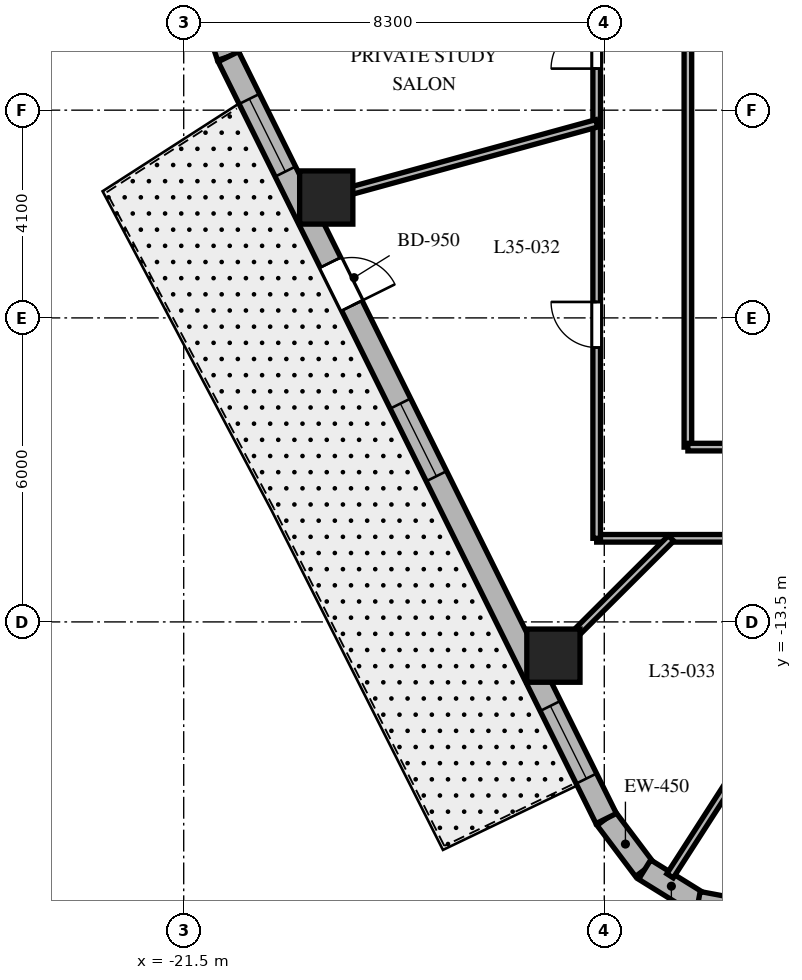
"""IFC4 building model, lengths in metres.
Left out: names, types, materials, properties, quantities, classifications, styles, units other than length and angle.
Written with IfcOpenShell. Run it as: python <this file> out.ifc"""

import sys

from ifc_helpers import new_model, si_unit, direction, frame, frame_2d, origin, origin_2d, place, context, subcontext, project, spatial, rectangle, extrude, element, fill, save


model = new_model("IFC4")
c1 = context("Model", 3, precision=1e-05, world=origin(), true_north=direction((0.0, 1.0)))
c2 = subcontext(c1, "Body", "Model", "MODEL_VIEW")
j1 = project(units=[si_unit("LENGTHUNIT", "METRE"), si_unit("PLANEANGLEUNIT", "RADIAN")], contexts=[c1])
p1 = place(None, origin())
s1 = spatial("IfcSite", under=j1, at=p1, CompositionType="ELEMENT")
p2 = place(p1, origin())
s2 = spatial("IfcBuilding", under=s1, at=p2, CompositionType="ELEMENT")
p3 = place(p2, frame((0.0, 0.0, 144.3)))
s3 = spatial("IfcBuildingStorey", under=s2, at=p3, CompositionType="ELEMENT", Elevation=144.3)
for number, where, z_axis, x_axis in (
    (1, (-18.687, -5.124, 0.0), (0.0, 0.0, 1.0), (1.0, 0.0, 0.0)),
    (2, (-14.204, -14.166, 0.0), (0.0, 0.0, 1.0), (1.0, 0.0, 0.0)),
):
    element("IfcColumn", number, at=place(p3, frame(where, z_axis=z_axis, x_axis=x_axis)), inside=s3, PredefinedType="COLUMN", context=c2, shape_type="SweptSolid", body=[
        extrude(rectangle(XDim=1.05, YDim=1.05, at=origin_2d()), origin(), (0.0, 0.0, 1.0), 3.7),
    ])
p4 = place(p3, frame((-13.162, -17.381, 0.0), z_axis=(0.0, 0.0, 1.0), x_axis=(0.601515770517, -0.798860925205, 0.0)))
e3 = element("IfcWall", 3, at=p4, inside=s3, PredefinedType="SOLIDWALL", context=c2, shape_type="SweptSolid", body=[
    extrude(rectangle(XDim=1.262, YDim=0.45, at=frame_2d((0.631, 0.0))), origin(), (0.0, 0.0, 1.0), 3.4),
])
p5 = place(p3, frame((-12.403, -18.389, 0.0), z_axis=(0.0, 0.0, 1.0), x_axis=(0.849795170926, -0.527113049991, 0.0)))
e4 = element("IfcWall", 4, at=p5, inside=s3, PredefinedType="SOLIDWALL", context=c2, shape_type="SweptSolid", body=[
    extrude(rectangle(XDim=1.241, YDim=0.45, at=frame_2d((0.62, 0.0))), origin(), (0.0, 0.0, 1.0), 3.4),
])
p6 = place(p3, frame((-11.349, -19.043, 0.0), z_axis=(0.0, 0.0, 1.0), x_axis=(0.982931267051, -0.183973161772, 0.0)))
e5 = element("IfcWall", 5, at=p6, inside=s3, PredefinedType="SOLIDWALL", context=c2, shape_type="SweptSolid", body=[
    extrude(rectangle(XDim=1.262, YDim=0.45, at=frame_2d((0.631, 0.0))), origin(), (0.0, 0.0, 1.0), 3.4),
])
p7 = place(p3, frame((-20.911, -1.484, 0.0), z_axis=(0.0, 0.0, 1.0), x_axis=(0.321623334353, -0.946867694453, 0.0)))
e6 = element("IfcWall", 6, at=p7, inside=s3, PredefinedType="SOLIDWALL", context=c2, shape_type="SweptSolid", body=[
    extrude(rectangle(XDim=0.909, YDim=0.45, at=frame_2d((0.454, 0.0))), origin(), (0.0, 0.0, 1.0), 3.4),
])
p8 = place(p3, frame((-20.618, -2.344, 0.0), z_axis=(0.0, 0.0, 1.0), x_axis=(0.444243691097, -0.895905990002, 0.0)))
e7 = element("IfcWall", 7, at=p8, inside=s3, PredefinedType="SOLIDWALL", context=c2, shape_type="SweptSolid", body=[
    extrude(rectangle(XDim=16.784, YDim=0.45, at=frame_2d((8.392, 0.0))), origin(), (0.0, 0.0, 1.0), 3.4),
])
p9 = place(p8, frame((4.535, 0.0, 0.0)))
e8 = element("IfcOpeningElement", 8, at=p9, cuts=e7, PredefinedType="OPENING", context=c2, shape_type="SweptSolid", body=[
    extrude(rectangle(XDim=0.95, YDim=2.15, at=frame_2d((0.475, 1.075))), frame((0.0, 0.235, 0.0), z_axis=(0.0, -1.0, 0.0), x_axis=(1.0, 0.0, 0.0)), (0.0, 0.0, 1.0), 0.47),
])
p10 = place(p8, frame((0.931, 0.0, 0.8)))
e9 = element("IfcOpeningElement", 9, at=p10, cuts=e7, PredefinedType="OPENING", context=c2, shape_type="SweptSolid", body=[
    extrude(rectangle(XDim=1.6, YDim=1.75, at=frame_2d((0.8, 0.875))), frame((0.0, 0.235, 0.0), z_axis=(0.0, -1.0, 0.0), x_axis=(1.0, 0.0, 0.0)), (0.0, 0.0, 1.0), 0.47),
])
p11 = place(p8, frame((7.642, 0.0, 0.8)))
e10 = element("IfcOpeningElement", 10, at=p11, cuts=e7, PredefinedType="OPENING", context=c2, shape_type="SweptSolid", body=[
    extrude(rectangle(XDim=1.6, YDim=1.75, at=frame_2d((0.8, 0.875))), frame((0.0, 0.235, 0.0), z_axis=(0.0, -1.0, 0.0), x_axis=(1.0, 0.0, 0.0)), (0.0, 0.0, 1.0), 0.47),
])
p12 = place(p8, frame((14.303, 0.0, 0.8)))
e11 = element("IfcOpeningElement", 11, at=p12, cuts=e7, PredefinedType="OPENING", context=c2, shape_type="SweptSolid", body=[
    extrude(rectangle(XDim=1.6, YDim=1.75, at=frame_2d((0.8, 0.875))), frame((0.0, 0.235, 0.0), z_axis=(0.0, -1.0, 0.0), x_axis=(1.0, 0.0, 0.0)), (0.0, 0.0, 1.0), 0.47),
])
p13 = place(p3, frame((13.35, -11.85, 0.0), z_axis=(0.0, 0.0, 1.0), x_axis=(-1.0, 0.0, 0.0)))
e12 = element("IfcWall", 12, at=p13, inside=s3, PredefinedType="PARTITIONING", context=c2, shape_type="SweptSolid", body=[
    extrude(rectangle(XDim=26.7, YDim=0.15, at=frame_2d((13.35, 0.0))), origin(), (0.0, 0.0, 1.0), 2.84),
])
p14 = place(p13, frame((22.7, 0.0, 0.0)))
e13 = element("IfcOpeningElement", 13, at=p14, cuts=e12, PredefinedType="OPENING", context=c2, shape_type="SweptSolid", body=[
    extrude(rectangle(XDim=0.9, YDim=2.03, at=frame_2d((0.45, 1.015))), frame((0.0, 0.085, 0.0), z_axis=(0.0, -1.0, 0.0), x_axis=(1.0, 0.0, 0.0)), (0.0, 0.0, 1.0), 0.17),
])
p15 = place(p13, frame((18.523, 0.0, 0.0)))
e14 = element("IfcOpeningElement", 14, at=p15, cuts=e12, PredefinedType="OPENING", context=c2, shape_type="SweptSolid", body=[
    extrude(rectangle(XDim=0.95, YDim=2.03, at=frame_2d((0.475, 1.015))), frame((0.0, 0.085, 0.0), z_axis=(0.0, -1.0, 0.0), x_axis=(1.0, 0.0, 0.0)), (0.0, 0.0, 1.0), 0.17),
])
p16 = place(p13, frame((12.362, 0.0, 0.0)))
e15 = element("IfcOpeningElement", 15, at=p16, cuts=e12, PredefinedType="OPENING", context=c2, shape_type="SweptSolid", body=[
    extrude(rectangle(XDim=0.95, YDim=2.03, at=frame_2d((0.475, 1.015))), frame((0.0, 0.085, 0.0), z_axis=(0.0, -1.0, 0.0), x_axis=(1.0, 0.0, 0.0)), (0.0, 0.0, 1.0), 0.17),
])
p17 = place(p13, frame((6.061, 0.0, 0.0)))
e16 = element("IfcOpeningElement", 16, at=p17, cuts=e12, PredefinedType="OPENING", context=c2, shape_type="SweptSolid", body=[
    extrude(rectangle(XDim=0.95, YDim=2.03, at=frame_2d((0.475, 1.015))), frame((0.0, 0.085, 0.0), z_axis=(0.0, -1.0, 0.0), x_axis=(1.0, 0.0, 0.0)), (0.0, 0.0, 1.0), 0.17),
])
p18 = place(p13, frame((1.886, 0.0, 0.0)))
e17 = element("IfcOpeningElement", 17, at=p18, cuts=e12, PredefinedType="OPENING", context=c2, shape_type="SweptSolid", body=[
    extrude(rectangle(XDim=0.9, YDim=2.03, at=frame_2d((0.45, 1.015))), frame((0.0, 0.085, 0.0), z_axis=(0.0, -1.0, 0.0), x_axis=(1.0, 0.0, 0.0)), (0.0, 0.0, 1.0), 0.17),
])
p19 = place(p3, frame((-13.35, -11.85, 0.0), z_axis=(0.0, 0.0, 1.0), x_axis=(0.0, 1.0, 0.0)))
e18 = element("IfcWall", 18, at=p19, inside=s3, PredefinedType="PARTITIONING", context=c2, shape_type="SweptSolid", body=[
    extrude(rectangle(XDim=23.7, YDim=0.15, at=frame_2d((11.85, 0.0))), origin(), (0.0, 0.0, 1.0), 2.84),
])
p20 = place(p19, frame((18.389, 0.0, 0.0)))
e19 = element("IfcOpeningElement", 19, at=p20, cuts=e18, PredefinedType="OPENING", context=c2, shape_type="SweptSolid", body=[
    extrude(rectangle(XDim=0.95, YDim=2.03, at=frame_2d((0.475, 1.015))), frame((0.0, 0.085, 0.0), z_axis=(0.0, -1.0, 0.0), x_axis=(1.0, 0.0, 0.0)), (0.0, 0.0, 1.0), 0.17),
])
p21 = place(p19, frame((12.315, 0.0, 0.0)))
e20 = element("IfcOpeningElement", 20, at=p21, cuts=e18, PredefinedType="OPENING", context=c2, shape_type="SweptSolid", body=[
    extrude(rectangle(XDim=0.9, YDim=2.03, at=frame_2d((0.45, 1.015))), frame((0.0, 0.085, 0.0), z_axis=(0.0, -1.0, 0.0), x_axis=(1.0, 0.0, 0.0)), (0.0, 0.0, 1.0), 0.17),
])
p22 = place(p19, frame((9.27, 0.0, 0.0)))
e21 = element("IfcOpeningElement", 21, at=p22, cuts=e18, PredefinedType="OPENING", context=c2, shape_type="SweptSolid", body=[
    extrude(rectangle(XDim=0.9, YDim=2.03, at=frame_2d((0.45, 1.015))), frame((0.0, 0.085, 0.0), z_axis=(0.0, -1.0, 0.0), x_axis=(1.0, 0.0, 0.0)), (0.0, 0.0, 1.0), 0.17),
])
p23 = place(p19, frame((3.765, 0.0, 0.0)))
e22 = element("IfcOpeningElement", 22, at=p23, cuts=e18, PredefinedType="OPENING", context=c2, shape_type="SweptSolid", body=[
    extrude(rectangle(XDim=0.9, YDim=2.03, at=frame_2d((0.45, 1.015))), frame((0.0, 0.085, 0.0), z_axis=(0.0, -1.0, 0.0), x_axis=(1.0, 0.0, 0.0)), (0.0, 0.0, 1.0), 0.17),
])
p24 = place(p3, frame((-11.55, 2.7, 0.0), z_axis=(0.0, 0.0, 1.0), x_axis=(0.0, -1.0, 0.0)))
e23 = element("IfcWall", 23, at=p24, inside=s3, PredefinedType="PARTITIONING", context=c2, shape_type="SweptSolid", body=[
    extrude(rectangle(XDim=12.75, YDim=0.15, at=frame_2d((6.375, 0.0))), origin(), (0.0, 0.0, 1.0), 2.84),
])
p25 = place(p3, frame((-11.55, -10.05, 0.0), z_axis=(0.0, 0.0, 1.0), x_axis=(1.0, 0.0, 0.0)))
e24 = element("IfcWall", 24, at=p25, inside=s3, PredefinedType="PARTITIONING", context=c2, shape_type="SweptSolid", body=[
    extrude(rectangle(XDim=11.55, YDim=0.15, at=frame_2d((5.775, 0.0))), origin(), (0.0, 0.0, 1.0), 2.84),
])
p26 = place(p3, frame((-13.35, -3.661, 0.0), z_axis=(0.0, 0.0, 1.0), x_axis=(-0.964397145454, -0.264458211898, 0.0)))
e25 = element("IfcWall", 25, at=p26, inside=s3, PredefinedType="PARTITIONING", context=c2, shape_type="SweptSolid", body=[
    extrude(rectangle(XDim=6.039, YDim=0.15, at=frame_2d((3.019, 0.0))), origin(), (0.0, 0.0, 1.0), 2.64),
])
p27 = place(p3, frame((-11.882, -11.85, 0.0), z_axis=(0.0, 0.0, 1.0), x_axis=(-0.708037373639, -0.706174962407, 0.0)))
e26 = element("IfcWall", 26, at=p27, inside=s3, PredefinedType="PARTITIONING", context=c2, shape_type="SweptSolid", body=[
    extrude(rectangle(XDim=3.802, YDim=0.15, at=frame_2d((1.901, 0.0))), origin(), (0.0, 0.0, 1.0), 2.64),
])
p28 = place(p3, frame((-7.619, -11.85, 0.0), z_axis=(0.0, 0.0, 1.0), x_axis=(-0.540829263478, -0.841132396098, 0.0)))
e27 = element("IfcWall", 27, at=p28, inside=s3, PredefinedType="PARTITIONING", context=c2, shape_type="SweptSolid", body=[
    extrude(rectangle(XDim=7.919, YDim=0.15, at=frame_2d((3.959, 0.0))), origin(), (0.0, 0.0, 1.0), 2.64),
])
p29 = place(p9, origin())
e28 = element("IfcDoor", 28, at=p29, inside=s3, OperationType="SINGLE_SWING_RIGHT", PredefinedType="DOOR", context=c2, shape_type="SweptSolid", body=[
    extrude(rectangle(XDim=0.95, YDim=2.15, at=frame_2d((0.475, 1.075))), frame((0.0, 0.025, 0.0), z_axis=(0.0, -1.0, 0.0), x_axis=(1.0, 0.0, 0.0)), (0.0, 0.0, 1.0), 0.05),
])
fill(e8, e28)
p30 = place(p10, origin())
e29 = element("IfcWindow", 29, at=p30, inside=s3, PartitioningType="SINGLE_PANEL", PredefinedType="WINDOW", context=c2, shape_type="SweptSolid", body=[
    extrude(rectangle(XDim=1.6, YDim=1.75, at=frame_2d((0.8, 0.875))), frame((0.0, 0.03, 0.0), z_axis=(0.0, -1.0, 0.0), x_axis=(1.0, 0.0, 0.0)), (0.0, 0.0, 1.0), 0.06),
])
fill(e9, e29)
p31 = place(p11, origin())
e30 = element("IfcWindow", 30, at=p31, inside=s3, PartitioningType="SINGLE_PANEL", PredefinedType="WINDOW", context=c2, shape_type="SweptSolid", body=[
    extrude(rectangle(XDim=1.6, YDim=1.75, at=frame_2d((0.8, 0.875))), frame((0.0, 0.03, 0.0), z_axis=(0.0, -1.0, 0.0), x_axis=(1.0, 0.0, 0.0)), (0.0, 0.0, 1.0), 0.06),
])
fill(e10, e30)
p32 = place(p12, origin())
e31 = element("IfcWindow", 31, at=p32, inside=s3, PartitioningType="SINGLE_PANEL", PredefinedType="WINDOW", context=c2, shape_type="SweptSolid", body=[
    extrude(rectangle(XDim=1.6, YDim=1.75, at=frame_2d((0.8, 0.875))), frame((0.0, 0.03, 0.0), z_axis=(0.0, -1.0, 0.0), x_axis=(1.0, 0.0, 0.0)), (0.0, 0.0, 1.0), 0.06),
])
fill(e11, e31)
p33 = place(p22, origin())
e32 = element("IfcDoor", 32, at=p33, inside=s3, OperationType="SINGLE_SWING_LEFT", PredefinedType="DOOR", context=c2, shape_type="SweptSolid", body=[
    extrude(rectangle(XDim=0.9, YDim=2.03, at=frame_2d((0.45, 1.015))), frame((0.0, 0.025, 0.0), z_axis=(0.0, -1.0, 0.0), x_axis=(1.0, 0.0, 0.0)), (0.0, 0.0, 1.0), 0.05),
])
fill(e21, e32)
p34 = place(p23, origin())
e33 = element("IfcDoor", 33, at=p34, inside=s3, OperationType="SINGLE_SWING_RIGHT", PredefinedType="DOOR", context=c2, shape_type="SweptSolid", body=[
    extrude(rectangle(XDim=0.9, YDim=2.03, at=frame_2d((0.45, 1.015))), frame((0.0, 0.025, 0.0), z_axis=(0.0, -1.0, 0.0), x_axis=(1.0, 0.0, 0.0)), (0.0, 0.0, 1.0), 0.05),
])
fill(e22, e33)
save(model, sys.argv[1])
